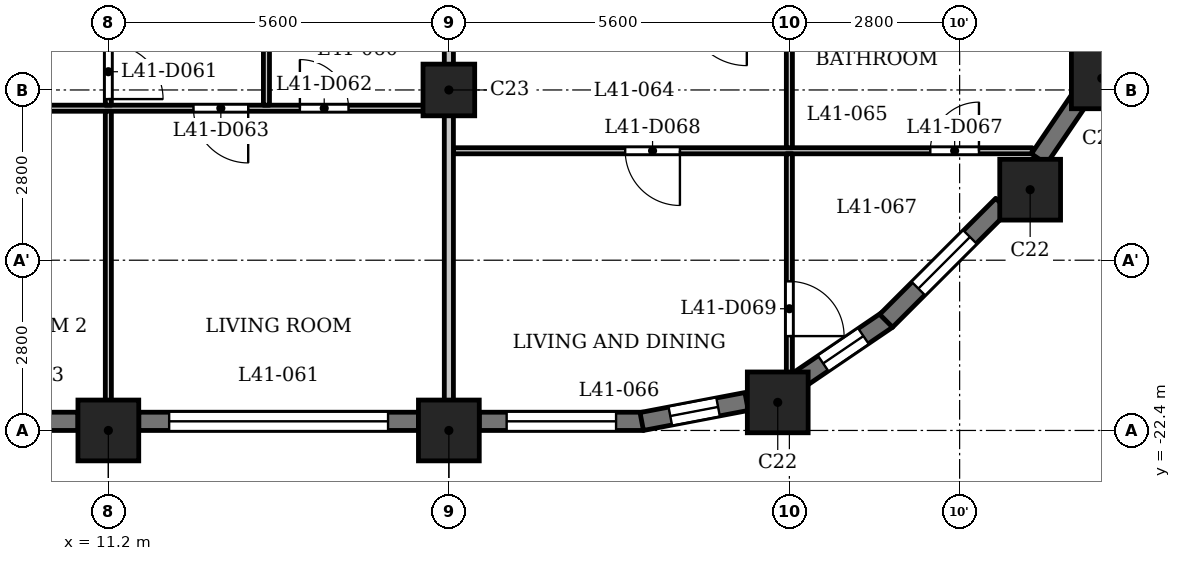
"""IFC4 building model, lengths in metres.
Left out: names, types, materials, properties, quantities, classifications, styles, units other than length and angle.
Written with IfcOpenShell. Run it as: python <this file> out.ifc"""

import sys

from ifc_helpers import new_model, si_unit, direction, frame, frame_2d, origin, origin_2d, place, context, subcontext, project, spatial, rectangle, extrude, element, fill, save


model = new_model("IFC4")
c1 = context("Model", 3, precision=1e-05, world=origin(), true_north=direction((0.0, 1.0)))
c2 = subcontext(c1, "Body", "Model", "MODEL_VIEW")
j1 = project(units=[si_unit("LENGTHUNIT", "METRE"), si_unit("PLANEANGLEUNIT", "RADIAN")], contexts=[c1])
p1 = place(None, origin())
s1 = spatial("IfcSite", under=j1, at=p1, CompositionType="ELEMENT")
p2 = place(p1, origin())
s2 = spatial("IfcBuilding", under=s1, at=p2, CompositionType="ELEMENT")
p3 = place(p2, frame((0.0, 0.0, 160.6)))
s3 = spatial("IfcBuildingStorey", under=s2, at=p3, CompositionType="ELEMENT", Elevation=160.6)
for number, where, z_axis, x_axis in (
    (1, (11.2, -22.4, 0.0), (0.0, 0.0, 1.0), (1.0, 0.0, 0.0)),
    (2, (16.8, -22.4, 0.0), (0.0, 0.0, 1.0), (1.0, 0.0, 0.0)),
    (3, (22.209, -21.938, 0.0), (0.0, 0.0, 1.0), (1.0, 0.0, 0.0)),
    (4, (26.36, -18.44, 0.0), (0.0, 0.0, 1.0), (1.0, 0.0, 0.0)),
    (5, (27.538, -16.609, 0.0), (0.0, 0.0, 1.0), (1.0, 0.0, 0.0)),
):
    element("IfcColumn", number, at=place(p3, frame(where, z_axis=z_axis, x_axis=x_axis)), inside=s3, PredefinedType="COLUMN", context=c2, shape_type="SweptSolid", body=[
        extrude(rectangle(XDim=1.0, YDim=1.0, at=origin_2d()), origin(), (0.0, 0.0, 1.0), 3.5),
    ])
p4 = place(p3, frame((16.8, -16.8, 0.0), z_axis=(0.0, 0.0, 1.0), x_axis=(1.0, 0.0, 0.0)))
e6 = element("IfcColumn", 6, at=p4, inside=s3, PredefinedType="COLUMN", context=c2, shape_type="SweptSolid", body=[
    extrude(rectangle(XDim=0.85, YDim=0.85, at=origin_2d()), origin(), (0.0, 0.0, 1.0), 3.5),
])
p5 = place(p3, frame((6.1, -22.25, 0.0), z_axis=(0.0, 0.0, 1.0), x_axis=(1.0, 0.0, 0.0)))
e7 = element("IfcWall", 7, at=p5, inside=s3, PredefinedType="SOLIDWALL", context=c2, shape_type="SweptSolid", body=[
    extrude(rectangle(XDim=4.6, YDim=0.3, at=frame_2d((2.3, 0.0))), origin(), (0.0, 0.0, 1.0), 2.45),
])
p6 = place(p5, frame((0.512, 0.0, 0.6)))
e8 = element("IfcOpeningElement", 8, at=p6, cuts=e7, PredefinedType="OPENING", context=c2, shape_type="SweptSolid", body=[
    extrude(rectangle(XDim=1.2, YDim=1.55, at=frame_2d((0.6, 0.775))), frame((0.0, 0.16, 0.0), z_axis=(0.0, -1.0, 0.0), x_axis=(1.0, 0.0, 0.0)), (0.0, 0.0, 1.0), 0.32),
])
p7 = place(p5, frame((2.887, 0.0, 0.6)))
e9 = element("IfcOpeningElement", 9, at=p7, cuts=e7, PredefinedType="OPENING", context=c2, shape_type="SweptSolid", body=[
    extrude(rectangle(XDim=1.2, YDim=1.55, at=frame_2d((0.6, 0.775))), frame((0.0, 0.16, 0.0), z_axis=(0.0, -1.0, 0.0), x_axis=(1.0, 0.0, 0.0)), (0.0, 0.0, 1.0), 0.32),
])
p8 = place(p3, frame((11.7, -22.25, 0.0), z_axis=(0.0, 0.0, 1.0), x_axis=(1.0, 0.0, 0.0)))
e10 = element("IfcWall", 10, at=p8, inside=s3, PredefinedType="SOLIDWALL", context=c2, shape_type="SweptSolid", body=[
    extrude(rectangle(XDim=4.6, YDim=0.3, at=frame_2d((2.3, 0.0))), origin(), (0.0, 0.0, 1.0), 2.45),
])
p9 = place(p8, frame((0.5, 0.0, 1.2)))
e11 = element("IfcOpeningElement", 11, at=p9, cuts=e10, PredefinedType="OPENING", context=c2, shape_type="SweptSolid", body=[
    extrude(rectangle(XDim=3.6, YDim=0.95, at=frame_2d((1.8, 0.475))), frame((0.0, 0.16, 0.0), z_axis=(0.0, -1.0, 0.0), x_axis=(1.0, 0.0, 0.0)), (0.0, 0.0, 1.0), 0.32),
])
p10 = place(p3, frame((17.3, -22.25, 0.0), z_axis=(0.0, 0.0, 1.0), x_axis=(1.0, 0.0, 0.0)))
e12 = element("IfcWall", 12, at=p10, inside=s3, PredefinedType="SOLIDWALL", context=c2, shape_type="SweptSolid", body=[
    extrude(rectangle(XDim=2.7, YDim=0.3, at=frame_2d((1.35, 0.0))), origin(), (0.0, 0.0, 1.0), 2.45),
])
p11 = place(p10, frame((0.45, 0.0, 0.9)))
e13 = element("IfcOpeningElement", 13, at=p11, cuts=e12, PredefinedType="OPENING", context=c2, shape_type="SweptSolid", body=[
    extrude(rectangle(XDim=1.8, YDim=1.25, at=frame_2d((0.9, 0.625))), frame((0.0, 0.16, 0.0), z_axis=(0.0, -1.0, 0.0), x_axis=(1.0, 0.0, 0.0)), (0.0, 0.0, 1.0), 0.32),
])
p12 = place(p3, frame((19.972, -22.253, 0.0), z_axis=(0.0, 0.0, 1.0), x_axis=(0.982284988433, 0.187393173565, 0.0)))
e14 = element("IfcWall", 14, at=p12, inside=s3, PredefinedType="SOLIDWALL", context=c2, shape_type="SweptSolid", body=[
    extrude(rectangle(XDim=1.756, YDim=0.3, at=frame_2d((0.878, 0.0))), origin(), (0.0, 0.0, 1.0), 2.45),
])
p13 = place(p12, frame((0.478, 0.0, 0.6)))
e15 = element("IfcOpeningElement", 15, at=p13, cuts=e14, PredefinedType="OPENING", context=c2, shape_type="SweptSolid", body=[
    extrude(rectangle(XDim=0.8, YDim=1.55, at=frame_2d((0.4, 0.775))), frame((0.0, 0.16, 0.0), z_axis=(0.0, -1.0, 0.0), x_axis=(1.0, 0.0, 0.0)), (0.0, 0.0, 1.0), 0.32),
])
p14 = place(p3, frame((22.56, -21.566, 0.0), z_axis=(0.0, 0.0, 1.0), x_axis=(0.82707645233, 0.562089443061, 0.0)))
e16 = element("IfcWall", 16, at=p14, inside=s3, PredefinedType="SOLIDWALL", context=c2, shape_type="SweptSolid", body=[
    extrude(rectangle(XDim=1.756, YDim=0.3, at=frame_2d((0.878, 0.0))), origin(), (0.0, 0.0, 1.0), 2.45),
])
p15 = place(p14, frame((0.478, 0.0, 0.6)))
e17 = element("IfcOpeningElement", 17, at=p15, cuts=e16, PredefinedType="OPENING", context=c2, shape_type="SweptSolid", body=[
    extrude(rectangle(XDim=0.8, YDim=1.55, at=frame_2d((0.4, 0.775))), frame((0.0, 0.16, 0.0), z_axis=(0.0, -1.0, 0.0), x_axis=(1.0, 0.0, 0.0)), (0.0, 0.0, 1.0), 0.32),
])
p16 = place(p3, frame((23.991, -20.597, 0.0), z_axis=(0.0, 0.0, 1.0), x_axis=(0.707106781187, 0.707106781187, 0.0)))
e18 = element("IfcWall", 18, at=p16, inside=s3, PredefinedType="SOLIDWALL", context=c2, shape_type="SweptSolid", body=[
    extrude(rectangle(XDim=2.7, YDim=0.3, at=frame_2d((1.35, 0.0))), origin(), (0.0, 0.0, 1.0), 2.45),
])
p17 = place(p16, frame((0.75, 0.0, 0.6)))
e19 = element("IfcOpeningElement", 19, at=p17, cuts=e18, PredefinedType="OPENING", context=c2, shape_type="SweptSolid", body=[
    extrude(rectangle(XDim=1.2, YDim=1.55, at=frame_2d((0.6, 0.775))), frame((0.0, 0.16, 0.0), z_axis=(0.0, -1.0, 0.0), x_axis=(1.0, 0.0, 0.0)), (0.0, 0.0, 1.0), 0.32),
])
p18 = place(p3, frame((26.504, -17.934, 0.0), z_axis=(0.0, 0.0, 1.0), x_axis=(0.562145470373, 0.827038372833, 0.0)))
e20 = element("IfcWall", 20, at=p18, inside=s3, PredefinedType="SOLIDWALL", context=c2, shape_type="SweptSolid", body=[
    extrude(rectangle(XDim=1.177, YDim=0.3, at=frame_2d((0.588, 0.0))), origin(), (0.0, 0.0, 1.0), 3.2),
])
p19 = place(p3, frame((16.875, -17.8, 0.0), z_axis=(0.0, 0.0, 1.0), x_axis=(1.0, 0.0, 0.0)))
e21 = element("IfcWall", 21, at=p19, inside=s3, PredefinedType="PARTITIONING", context=c2, shape_type="SweptSolid", body=[
    extrude(rectangle(XDim=9.519, YDim=0.1, at=frame_2d((4.76, 0.0))), origin(), (0.0, 0.0, 1.0), 3.2),
])
p20 = place(p19, frame((7.843, 0.0, 0.0)))
e22 = element("IfcOpeningElement", 22, at=p20, cuts=e21, PredefinedType="OPENING", context=c2, shape_type="SweptSolid", body=[
    extrude(rectangle(XDim=0.8, YDim=2.1, at=frame_2d((0.4, 1.05))), frame((0.0, 0.06, 0.0), z_axis=(0.0, -1.0, 0.0), x_axis=(1.0, 0.0, 0.0)), (0.0, 0.0, 1.0), 0.12),
])
p21 = place(p19, frame((2.825, 0.0, 0.0)))
e23 = element("IfcOpeningElement", 23, at=p21, cuts=e21, PredefinedType="OPENING", context=c2, shape_type="SweptSolid", body=[
    extrude(rectangle(XDim=0.9, YDim=2.1, at=frame_2d((0.45, 1.05))), frame((0.0, 0.06, 0.0), z_axis=(0.0, -1.0, 0.0), x_axis=(1.0, 0.0, 0.0)), (0.0, 0.0, 1.0), 0.12),
])
p22 = place(p3, frame((-16.725, -17.1, 0.0), z_axis=(0.0, 0.0, 1.0), x_axis=(1.0, 0.0, 0.0)))
e24 = element("IfcWall", 24, at=p22, inside=s3, PredefinedType="PARTITIONING", context=c2, shape_type="SweptSolid", body=[
    extrude(rectangle(XDim=33.45, YDim=0.1, at=frame_2d((16.725, 0.0))), origin(), (0.0, 0.0, 1.0), 3.2),
])
p23 = place(p22, frame((0.725, 0.0, 0.0)))
e25 = element("IfcOpeningElement", 25, at=p23, cuts=e24, PredefinedType="OPENING", context=c2, shape_type="SweptSolid", body=[
    extrude(rectangle(XDim=0.8, YDim=2.1, at=frame_2d((0.4, 1.05))), frame((0.0, 0.06, 0.0), z_axis=(0.0, -1.0, 0.0), x_axis=(1.0, 0.0, 0.0)), (0.0, 0.0, 1.0), 0.12),
])
p24 = place(p22, frame((3.175, 0.0, 0.0)))
e26 = element("IfcOpeningElement", 26, at=p24, cuts=e24, PredefinedType="OPENING", context=c2, shape_type="SweptSolid", body=[
    extrude(rectangle(XDim=0.9, YDim=2.1, at=frame_2d((0.45, 1.05))), frame((0.0, 0.06, 0.0), z_axis=(0.0, -1.0, 0.0), x_axis=(1.0, 0.0, 0.0)), (0.0, 0.0, 1.0), 0.12),
])
p25 = place(p22, frame((6.075, 0.0, 0.0)))
e27 = element("IfcOpeningElement", 27, at=p25, cuts=e24, PredefinedType="OPENING", context=c2, shape_type="SweptSolid", body=[
    extrude(rectangle(XDim=0.8, YDim=2.1, at=frame_2d((0.4, 1.05))), frame((0.0, 0.06, 0.0), z_axis=(0.0, -1.0, 0.0), x_axis=(1.0, 0.0, 0.0)), (0.0, 0.0, 1.0), 0.12),
])
p26 = place(p22, frame((9.425, 0.0, 0.0)))
e28 = element("IfcOpeningElement", 28, at=p26, cuts=e24, PredefinedType="OPENING", context=c2, shape_type="SweptSolid", body=[
    extrude(rectangle(XDim=0.9, YDim=2.1, at=frame_2d((0.45, 1.05))), frame((0.0, 0.06, 0.0), z_axis=(0.0, -1.0, 0.0), x_axis=(1.0, 0.0, 0.0)), (0.0, 0.0, 1.0), 0.12),
])
p27 = place(p22, frame((12.675, 0.0, 0.0)))
e29 = element("IfcOpeningElement", 29, at=p27, cuts=e24, PredefinedType="OPENING", context=c2, shape_type="SweptSolid", body=[
    extrude(rectangle(XDim=0.8, YDim=2.1, at=frame_2d((0.4, 1.05))), frame((0.0, 0.06, 0.0), z_axis=(0.0, -1.0, 0.0), x_axis=(1.0, 0.0, 0.0)), (0.0, 0.0, 1.0), 0.12),
])
p28 = place(p22, frame((15.275, 0.0, 0.0)))
e30 = element("IfcOpeningElement", 30, at=p28, cuts=e24, PredefinedType="OPENING", context=c2, shape_type="SweptSolid", body=[
    extrude(rectangle(XDim=0.9, YDim=2.1, at=frame_2d((0.45, 1.05))), frame((0.0, 0.06, 0.0), z_axis=(0.0, -1.0, 0.0), x_axis=(1.0, 0.0, 0.0)), (0.0, 0.0, 1.0), 0.12),
])
p29 = place(p22, frame((20.625, 0.0, 0.0)))
e31 = element("IfcOpeningElement", 31, at=p29, cuts=e24, PredefinedType="OPENING", context=c2, shape_type="SweptSolid", body=[
    extrude(rectangle(XDim=0.8, YDim=2.1, at=frame_2d((0.4, 1.05))), frame((0.0, 0.06, 0.0), z_axis=(0.0, -1.0, 0.0), x_axis=(1.0, 0.0, 0.0)), (0.0, 0.0, 1.0), 0.12),
])
p30 = place(p22, frame((17.375, 0.0, 0.0)))
e32 = element("IfcOpeningElement", 32, at=p30, cuts=e24, PredefinedType="OPENING", context=c2, shape_type="SweptSolid", body=[
    extrude(rectangle(XDim=0.9, YDim=2.1, at=frame_2d((0.45, 1.05))), frame((0.0, 0.06, 0.0), z_axis=(0.0, -1.0, 0.0), x_axis=(1.0, 0.0, 0.0)), (0.0, 0.0, 1.0), 0.12),
])
p31 = place(p22, frame((31.075, 0.0, 0.0)))
e33 = element("IfcOpeningElement", 33, at=p31, cuts=e24, PredefinedType="OPENING", context=c2, shape_type="SweptSolid", body=[
    extrude(rectangle(XDim=0.8, YDim=2.1, at=frame_2d((0.4, 1.05))), frame((0.0, 0.06, 0.0), z_axis=(0.0, -1.0, 0.0), x_axis=(1.0, 0.0, 0.0)), (0.0, 0.0, 1.0), 0.12),
])
p32 = place(p22, frame((29.325, 0.0, 0.0)))
e34 = element("IfcOpeningElement", 34, at=p32, cuts=e24, PredefinedType="OPENING", context=c2, shape_type="SweptSolid", body=[
    extrude(rectangle(XDim=0.9, YDim=2.1, at=frame_2d((0.45, 1.05))), frame((0.0, 0.06, 0.0), z_axis=(0.0, -1.0, 0.0), x_axis=(1.0, 0.0, 0.0)), (0.0, 0.0, 1.0), 0.12),
])
p33 = place(p22, frame((23.725, 0.0, 0.0)))
e35 = element("IfcOpeningElement", 35, at=p33, cuts=e24, PredefinedType="OPENING", context=c2, shape_type="SweptSolid", body=[
    extrude(rectangle(XDim=0.9, YDim=2.1, at=frame_2d((0.45, 1.05))), frame((0.0, 0.06, 0.0), z_axis=(0.0, -1.0, 0.0), x_axis=(1.0, 0.0, 0.0)), (0.0, 0.0, 1.0), 0.12),
])
p34 = place(p22, frame((25.775, 0.0, 0.0)))
e36 = element("IfcOpeningElement", 36, at=p34, cuts=e24, PredefinedType="OPENING", context=c2, shape_type="SweptSolid", body=[
    extrude(rectangle(XDim=0.9, YDim=2.1, at=frame_2d((0.45, 1.05))), frame((0.0, 0.06, 0.0), z_axis=(0.0, -1.0, 0.0), x_axis=(1.0, 0.0, 0.0)), (0.0, 0.0, 1.0), 0.12),
])
p35 = place(p3, frame((11.2, -22.88, 0.0), z_axis=(0.0, 0.0, 1.0), x_axis=(0.0, 1.0, 0.0)))
e37 = element("IfcWall", 37, at=p35, inside=s3, PredefinedType="PARTITIONING", context=c2, shape_type="SweptSolid", body=[
    extrude(rectangle(XDim=5.73, YDim=0.1, at=frame_2d((2.865, 0.0))), origin(), (0.0, 0.0, 1.0), 3.2),
])
p36 = place(p3, frame((11.2, -17.05, 0.0), z_axis=(0.0, 0.0, 1.0), x_axis=(0.0, 1.0, 0.0)))
e38 = element("IfcWall", 38, at=p36, inside=s3, PredefinedType="PARTITIONING", context=c2, shape_type="SweptSolid", body=[
    extrude(rectangle(XDim=3.775, YDim=0.1, at=frame_2d((1.888, 0.0))), origin(), (0.0, 0.0, 1.0), 3.2),
])
p37 = place(p36, frame((0.1, 0.0, 0.0)))
e39 = element("IfcOpeningElement", 39, at=p37, cuts=e38, PredefinedType="OPENING", context=c2, shape_type="SweptSolid", body=[
    extrude(rectangle(XDim=0.9, YDim=2.1, at=frame_2d((0.45, 1.05))), frame((0.0, 0.06, 0.0), z_axis=(0.0, -1.0, 0.0), x_axis=(1.0, 0.0, 0.0)), (0.0, 0.0, 1.0), 0.12),
])
p38 = place(p3, frame((13.8, -17.05, 0.0), z_axis=(0.0, 0.0, 1.0), x_axis=(0.0, 1.0, 0.0)))
e40 = element("IfcWall", 40, at=p38, inside=s3, PredefinedType="PARTITIONING", context=c2, shape_type="SweptSolid", body=[
    extrude(rectangle(XDim=3.775, YDim=0.1, at=frame_2d((1.888, 0.0))), origin(), (0.0, 0.0, 1.0), 3.2),
])
p39 = place(p3, frame((16.8, -22.88, 0.0), z_axis=(0.0, 0.0, 1.0), x_axis=(0.0, 1.0, 0.0)))
e41 = element("IfcWall", 41, at=p39, inside=s3, PredefinedType="PARTITIONING", context=c2, shape_type="SweptSolid", body=[
    extrude(rectangle(XDim=7.405, YDim=0.15, at=frame_2d((3.702, 0.0))), origin(), (0.0, 0.0, 1.0), 3.2),
])
p40 = place(p3, frame((22.4, -21.72, 0.0), z_axis=(0.0, 0.0, 1.0), x_axis=(0.0, 1.0, 0.0)))
e42 = element("IfcWall", 42, at=p40, inside=s3, PredefinedType="PARTITIONING", context=c2, shape_type="SweptSolid", body=[
    extrude(rectangle(XDim=3.87, YDim=0.1, at=frame_2d((1.935, 0.0))), origin(), (0.0, 0.0, 1.0), 3.2),
])
p41 = place(p40, frame((0.872, 0.0, 0.0)))
e43 = element("IfcOpeningElement", 43, at=p41, cuts=e42, PredefinedType="OPENING", context=c2, shape_type="SweptSolid", body=[
    extrude(rectangle(XDim=0.9, YDim=2.1, at=frame_2d((0.45, 1.05))), frame((0.0, 0.06, 0.0), z_axis=(0.0, -1.0, 0.0), x_axis=(1.0, 0.0, 0.0)), (0.0, 0.0, 1.0), 0.12),
])
p42 = place(p3, frame((22.4, -17.75, 0.0), z_axis=(0.0, 0.0, 1.0), x_axis=(0.0, 1.0, 0.0)))
e44 = element("IfcWall", 44, at=p42, inside=s3, PredefinedType="PARTITIONING", context=c2, shape_type="SweptSolid", body=[
    extrude(rectangle(XDim=2.275, YDim=0.1, at=frame_2d((1.137, 0.0))), origin(), (0.0, 0.0, 1.0), 3.2),
])
p43 = place(p37, origin())
e45 = element("IfcDoor", 45, at=p43, inside=s3, OperationType="SINGLE_SWING_LEFT", PredefinedType="DOOR", context=c2, shape_type="SweptSolid", body=[
    extrude(rectangle(XDim=0.9, YDim=2.1, at=frame_2d((0.45, 1.05))), frame((0.0, 0.025, 0.0), z_axis=(0.0, -1.0, 0.0), x_axis=(1.0, 0.0, 0.0)), (0.0, 0.0, 1.0), 0.05),
])
fill(e39, e45)
p44 = place(p31, origin())
e46 = element("IfcDoor", 46, at=p44, inside=s3, OperationType="SINGLE_SWING_RIGHT", PredefinedType="DOOR", context=c2, shape_type="SweptSolid", body=[
    extrude(rectangle(XDim=0.8, YDim=2.1, at=frame_2d((0.4, 1.05))), frame((0.0, 0.025, 0.0), z_axis=(0.0, -1.0, 0.0), x_axis=(1.0, 0.0, 0.0)), (0.0, 0.0, 1.0), 0.05),
])
fill(e33, e46)
p45 = place(p32, origin())
e47 = element("IfcDoor", 47, at=p45, inside=s3, OperationType="SINGLE_SWING_RIGHT", PredefinedType="DOOR", context=c2, shape_type="SweptSolid", body=[
    extrude(rectangle(XDim=0.9, YDim=2.1, at=frame_2d((0.45, 1.05))), frame((0.0, 0.025, 0.0), z_axis=(0.0, -1.0, 0.0), x_axis=(1.0, 0.0, 0.0)), (0.0, 0.0, 1.0), 0.05),
])
fill(e34, e47)
p46 = place(p20, origin())
e48 = element("IfcDoor", 48, at=p46, inside=s3, OperationType="SINGLE_SWING_LEFT", PredefinedType="DOOR", context=c2, shape_type="SweptSolid", body=[
    extrude(rectangle(XDim=0.8, YDim=2.1, at=frame_2d((0.4, 1.05))), frame((0.0, 0.025, 0.0), z_axis=(0.0, -1.0, 0.0), x_axis=(1.0, 0.0, 0.0)), (0.0, 0.0, 1.0), 0.05),
])
fill(e22, e48)
p47 = place(p21, origin())
e49 = element("IfcDoor", 49, at=p47, inside=s3, OperationType="SINGLE_SWING_RIGHT", PredefinedType="DOOR", context=c2, shape_type="SweptSolid", body=[
    extrude(rectangle(XDim=0.9, YDim=2.1, at=frame_2d((0.45, 1.05))), frame((0.0, 0.025, 0.0), z_axis=(0.0, -1.0, 0.0), x_axis=(1.0, 0.0, 0.0)), (0.0, 0.0, 1.0), 0.05),
])
fill(e23, e49)
p48 = place(p41, origin())
e50 = element("IfcDoor", 50, at=p48, inside=s3, OperationType="SINGLE_SWING_LEFT", PredefinedType="DOOR", context=c2, shape_type="SweptSolid", body=[
    extrude(rectangle(XDim=0.9, YDim=2.1, at=frame_2d((0.45, 1.05))), frame((0.0, 0.025, 0.0), z_axis=(0.0, -1.0, 0.0), x_axis=(1.0, 0.0, 0.0)), (0.0, 0.0, 1.0), 0.05),
])
fill(e43, e50)
p49 = place(p9, origin())
e51 = element("IfcWindow", 51, at=p49, inside=s3, PartitioningType="SINGLE_PANEL", PredefinedType="WINDOW", context=c2, shape_type="SweptSolid", body=[
    extrude(rectangle(XDim=3.6, YDim=0.95, at=frame_2d((1.8, 0.475))), frame((0.0, 0.03, 0.0), z_axis=(0.0, -1.0, 0.0), x_axis=(1.0, 0.0, 0.0)), (0.0, 0.0, 1.0), 0.06),
])
fill(e11, e51)
p50 = place(p11, origin())
e52 = element("IfcWindow", 52, at=p50, inside=s3, PartitioningType="SINGLE_PANEL", PredefinedType="WINDOW", context=c2, shape_type="SweptSolid", body=[
    extrude(rectangle(XDim=1.8, YDim=1.25, at=frame_2d((0.9, 0.625))), frame((0.0, 0.03, 0.0), z_axis=(0.0, -1.0, 0.0), x_axis=(1.0, 0.0, 0.0)), (0.0, 0.0, 1.0), 0.06),
])
fill(e13, e52)
p51 = place(p13, origin())
e53 = element("IfcWindow", 53, at=p51, inside=s3, PartitioningType="SINGLE_PANEL", PredefinedType="WINDOW", context=c2, shape_type="SweptSolid", body=[
    extrude(rectangle(XDim=0.8, YDim=1.55, at=frame_2d((0.4, 0.775))), frame((0.0, 0.03, 0.0), z_axis=(0.0, -1.0, 0.0), x_axis=(1.0, 0.0, 0.0)), (0.0, 0.0, 1.0), 0.06),
])
fill(e15, e53)
p52 = place(p15, origin())
e54 = element("IfcWindow", 54, at=p52, inside=s3, PartitioningType="SINGLE_PANEL", PredefinedType="WINDOW", context=c2, shape_type="SweptSolid", body=[
    extrude(rectangle(XDim=0.8, YDim=1.55, at=frame_2d((0.4, 0.775))), frame((0.0, 0.03, 0.0), z_axis=(0.0, -1.0, 0.0), x_axis=(1.0, 0.0, 0.0)), (0.0, 0.0, 1.0), 0.06),
])
fill(e17, e54)
p53 = place(p17, origin())
e55 = element("IfcWindow", 55, at=p53, inside=s3, PartitioningType="SINGLE_PANEL", PredefinedType="WINDOW", context=c2, shape_type="SweptSolid", body=[
    extrude(rectangle(XDim=1.2, YDim=1.55, at=frame_2d((0.6, 0.775))), frame((0.0, 0.03, 0.0), z_axis=(0.0, -1.0, 0.0), x_axis=(1.0, 0.0, 0.0)), (0.0, 0.0, 1.0), 0.06),
])
fill(e19, e55)
save(model, sys.argv[1])
